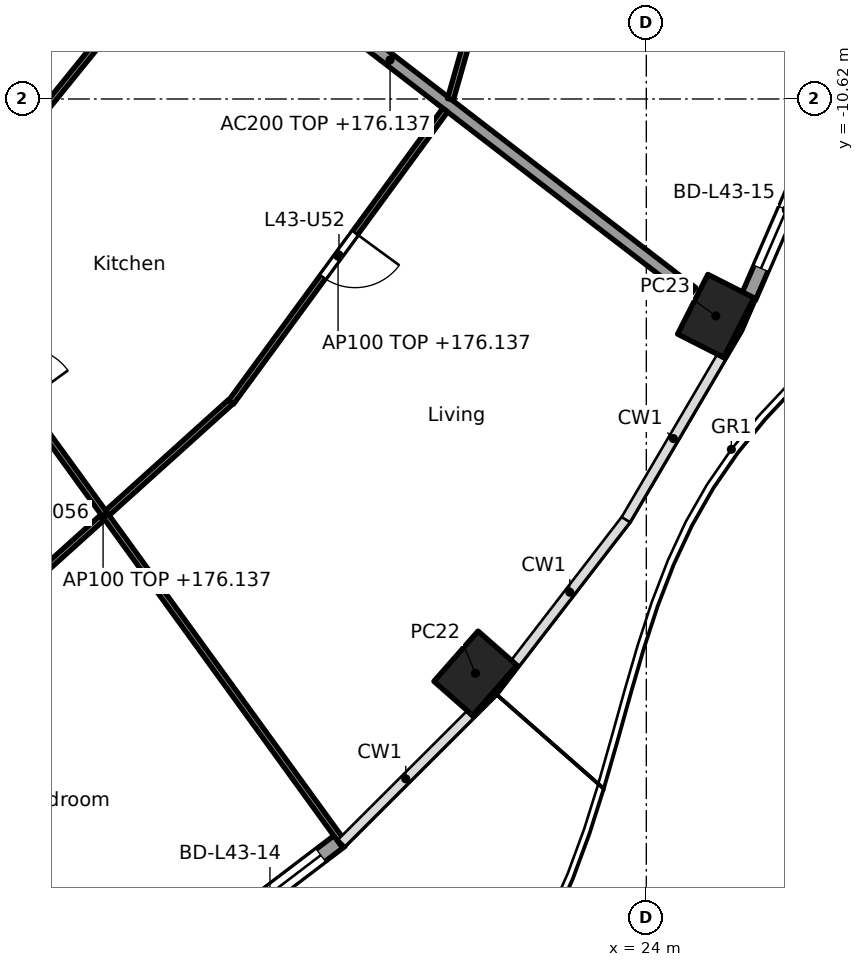
"""IFC4 building model, lengths in metres.
Left out: names, types, materials, properties, quantities, classifications, styles, units other than length and angle.
Written with IfcOpenShell. Run it as: python <this file> out.ifc"""

import sys

from ifc_helpers import new_model, si_unit, direction, frame, frame_2d, origin, origin_2d, place, context, subcontext, project, spatial, rectangle, hollow_rectangle, extrude, element, fill, save


model = new_model("IFC4")
c1 = context("Model", 3, precision=1e-05, world=origin(), true_north=direction((0.0, 1.0)))
c2 = subcontext(c1, "Body", "Model", "MODEL_VIEW")
j1 = project(units=[si_unit("LENGTHUNIT", "METRE"), si_unit("PLANEANGLEUNIT", "RADIAN")], contexts=[c1])
p1 = place(None, origin())
s1 = spatial("IfcSite", under=j1, at=p1, CompositionType="ELEMENT")
p2 = place(p1, origin())
s2 = spatial("IfcBuilding", under=s1, at=p2, CompositionType="ELEMENT")
p3 = place(p2, frame((0.0, 0.0, 173.3)))
s3 = spatial("IfcBuildingStorey", under=s2, at=p3, CompositionType="ELEMENT", Elevation=173.3)
for number, where, z_axis, x_axis in (
    (1, (21.189, -20.064, 0.0), (0.0, 0.0, 1.0), (0.66, 0.751, 0.0)),
    (2, (25.142, -14.188, 0.0), (0.0, 0.0, 1.0), (0.452, 0.892, 0.0)),
):
    element("IfcColumn", number, at=place(p3, frame(where, z_axis=z_axis, x_axis=x_axis)), inside=s3, PredefinedType="COLUMN", context=c2, shape_type="SweptSolid", body=[
        extrude(hollow_rectangle(XDim=1.1, YDim=0.85, WallThickness=0.036, at=origin_2d()), origin(), (0.0, 0.0, 1.0), 3.7),
    ])
p4 = place(p3, frame((18.972, -22.809, 0.0), z_axis=(0.0, 0.0, 1.0), x_axis=(-0.796055733703, -0.60522332146, 0.0)))
e3 = element("IfcWall", 3, at=p4, inside=s3, PredefinedType="SOLIDWALL", context=c2, shape_type="SweptSolid", body=[
    extrude(rectangle(XDim=2.917, YDim=0.25, at=frame_2d((1.458, 0.0))), origin(), (0.0, 0.0, 1.0), 3.44),
])
p5 = place(p4, frame((0.408, 0.0, 0.0)))
e4 = element("IfcOpeningElement", 4, at=p5, cuts=e3, PredefinedType="OPENING", context=c2, shape_type="SweptSolid", body=[
    extrude(rectangle(XDim=2.1, YDim=2.4, at=frame_2d((1.05, 1.2))), frame((0.0, 0.135, 0.0), z_axis=(0.0, -1.0, 0.0), x_axis=(1.0, 0.0, 0.0)), (0.0, 0.0, 1.0), 0.27),
])
p6 = place(p3, frame((26.929, -11.0, 0.0), z_axis=(0.0, 0.0, 1.0), x_axis=(-0.397620521824, -0.917549955384, 0.0)))
e5 = element("IfcWall", 5, at=p6, inside=s3, PredefinedType="SOLIDWALL", context=c2, shape_type="SweptSolid", body=[
    extrude(rectangle(XDim=3.142, YDim=0.25, at=frame_2d((1.571, 0.0))), origin(), (0.0, 0.0, 1.0), 3.44),
])
p7 = place(p6, frame((0.521, 0.0, 0.0)))
e6 = element("IfcOpeningElement", 6, at=p7, cuts=e5, PredefinedType="OPENING", context=c2, shape_type="SweptSolid", body=[
    extrude(rectangle(XDim=2.1, YDim=2.4, at=frame_2d((1.05, 1.2))), frame((0.0, 0.135, 0.0), z_axis=(0.0, -1.0, 0.0), x_axis=(1.0, 0.0, 0.0)), (0.0, 0.0, 1.0), 0.27),
])
p8 = place(p3, frame((14.822, -6.154, 0.0), z_axis=(0.0, 0.0, 1.0), x_axis=(0.792203056092, -0.610257583254, 0.0)))
e7 = element("IfcWall", 7, at=p8, inside=s3, PredefinedType="PARTITIONING", context=c2, shape_type="SweptSolid", body=[
    extrude(rectangle(XDim=12.533, YDim=0.2, at=frame_2d((6.266, 0.0))), origin(), (0.0, 0.0, 1.0), 2.837),
])
p9 = place(p3, frame((12.971, -19.38, 0.0), z_axis=(0.0, 0.0, 1.0), x_axis=(0.742768881471, 0.669547898748, 0.0)))
e8 = element("IfcWall", 8, at=p9, inside=s3, PredefinedType="PARTITIONING", context=c2, shape_type="SweptSolid", body=[
    extrude(rectangle(XDim=5.642, YDim=0.1, at=frame_2d((2.821, 0.0))), origin(), (0.0, 0.0, 1.0), 2.837),
])
p10 = place(p3, frame((8.943, -8.966, 0.0), z_axis=(0.0, 0.0, 1.0), x_axis=(0.586803608919, -0.809729290912, 0.0)))
e9 = element("IfcWall", 9, at=p10, inside=s3, PredefinedType="PARTITIONING", context=c2, shape_type="SweptSolid", body=[
    extrude(rectangle(XDim=17.179, YDim=0.1, at=frame_2d((8.589, 0.0))), origin(), (0.0, 0.0, 1.0), 2.756),
])
p11 = place(p10, frame((2.062, 0.0, 0.0)))
e10 = element("IfcOpeningElement", 10, at=p11, cuts=e9, PredefinedType="OPENING", context=c2, shape_type="SweptSolid", body=[
    extrude(rectangle(XDim=0.9, YDim=2.1, at=frame_2d((0.45, 1.05))), frame((0.0, 0.06, 0.0), z_axis=(0.0, -1.0, 0.0), x_axis=(1.0, 0.0, 0.0)), (0.0, 0.0, 1.0), 0.12),
])
p12 = place(p10, frame((7.308, 0.0, 0.0)))
e11 = element("IfcOpeningElement", 11, at=p12, cuts=e9, PredefinedType="OPENING", context=c2, shape_type="SweptSolid", body=[
    extrude(rectangle(XDim=0.9, YDim=2.1, at=frame_2d((0.45, 1.05))), frame((0.0, 0.06, 0.0), z_axis=(0.0, -1.0, 0.0), x_axis=(1.0, 0.0, 0.0)), (0.0, 0.0, 1.0), 0.12),
])
p13 = place(p3, frame((13.509, -11.525, 0.0), z_axis=(0.0, 0.0, 1.0), x_axis=(0.628764602857, 0.777595700987, 0.0)))
e12 = element("IfcWall", 12, at=p13, inside=s3, PredefinedType="PARTITIONING", context=c2, shape_type="SweptSolid", body=[
    extrude(rectangle(XDim=4.957, YDim=0.1, at=frame_2d((2.479, 0.0))), origin(), (0.0, 0.0, 1.0), 2.837),
])
p14 = place(p3, frame((17.169, -15.609, 0.0), z_axis=(0.0, 0.0, 1.0), x_axis=(0.591122127251, 0.806582066918, 0.0)))
e13 = element("IfcWall", 13, at=p14, inside=s3, PredefinedType="PARTITIONING", context=c2, shape_type="SweptSolid", body=[
    extrude(rectangle(XDim=5.96, YDim=0.1, at=frame_2d((2.98, 0.0))), origin(), (0.0, 0.0, 1.0), 2.837),
])
p15 = place(p14, frame((2.555, 0.0, 0.0)))
e14 = element("IfcOpeningElement", 14, at=p15, cuts=e13, PredefinedType="OPENING", context=c2, shape_type="SweptSolid", body=[
    extrude(rectangle(XDim=0.9, YDim=2.1, at=frame_2d((0.45, 1.05))), frame((0.0, 0.06, 0.0), z_axis=(0.0, -1.0, 0.0), x_axis=(1.0, 0.0, 0.0)), (0.0, 0.0, 1.0), 0.12),
])
p16 = place(p3, frame((20.779, -10.625, 0.0), z_axis=(0.0, 0.0, 1.0), x_axis=(0.273819702124, 0.961781040949, 0.0)))
e15 = element("IfcWall", 15, at=p16, inside=s3, PredefinedType="PARTITIONING", context=c2, shape_type="SweptSolid", body=[
    extrude(rectangle(XDim=5.152, YDim=0.1, at=frame_2d((2.576, 0.0))), origin(), (0.0, 0.0, 1.0), 2.837),
])
p17 = place(p16, frame((2.126, 0.0, 0.0)))
e16 = element("IfcOpeningElement", 16, at=p17, cuts=e15, PredefinedType="OPENING", context=c2, shape_type="SweptSolid", body=[
    extrude(rectangle(XDim=0.9, YDim=2.1, at=frame_2d((0.45, 1.05))), frame((0.0, 0.06, 0.0), z_axis=(0.0, -1.0, 0.0), x_axis=(1.0, 0.0, 0.0)), (0.0, 0.0, 1.0), 0.12),
])
p18 = place(p5, origin())
e17 = element("IfcDoor", 17, at=p18, inside=s3, OperationType="SLIDING_TO_LEFT", PredefinedType="DOOR", context=c2, shape_type="SweptSolid", body=[
    extrude(rectangle(XDim=2.1, YDim=2.4, at=frame_2d((1.05, 1.2))), frame((0.0, 0.025, 0.0), z_axis=(0.0, -1.0, 0.0), x_axis=(1.0, 0.0, 0.0)), (0.0, 0.0, 1.0), 0.05),
])
fill(e4, e17)
p19 = place(p7, origin())
e18 = element("IfcDoor", 18, at=p19, inside=s3, OperationType="SLIDING_TO_LEFT", PredefinedType="DOOR", context=c2, shape_type="SweptSolid", body=[
    extrude(rectangle(XDim=2.1, YDim=2.4, at=frame_2d((1.05, 1.2))), frame((0.0, 0.025, 0.0), z_axis=(0.0, -1.0, 0.0), x_axis=(1.0, 0.0, 0.0)), (0.0, 0.0, 1.0), 0.05),
])
fill(e6, e18)
p20 = place(p15, frame((0.9, 0.0, 0.0), x_axis=(-1.0, 0.0, 0.0)))
e19 = element("IfcDoor", 19, at=p20, inside=s3, OperationType="SINGLE_SWING_LEFT", PredefinedType="DOOR", context=c2, shape_type="SweptSolid", body=[
    extrude(rectangle(XDim=0.9, YDim=2.1, at=frame_2d((0.45, 1.05))), frame((0.0, 0.025, 0.0), z_axis=(0.0, -1.0, 0.0), x_axis=(1.0, 0.0, 0.0)), (0.0, 0.0, 1.0), 0.05),
])
fill(e14, e19)
save(model, sys.argv[1])
